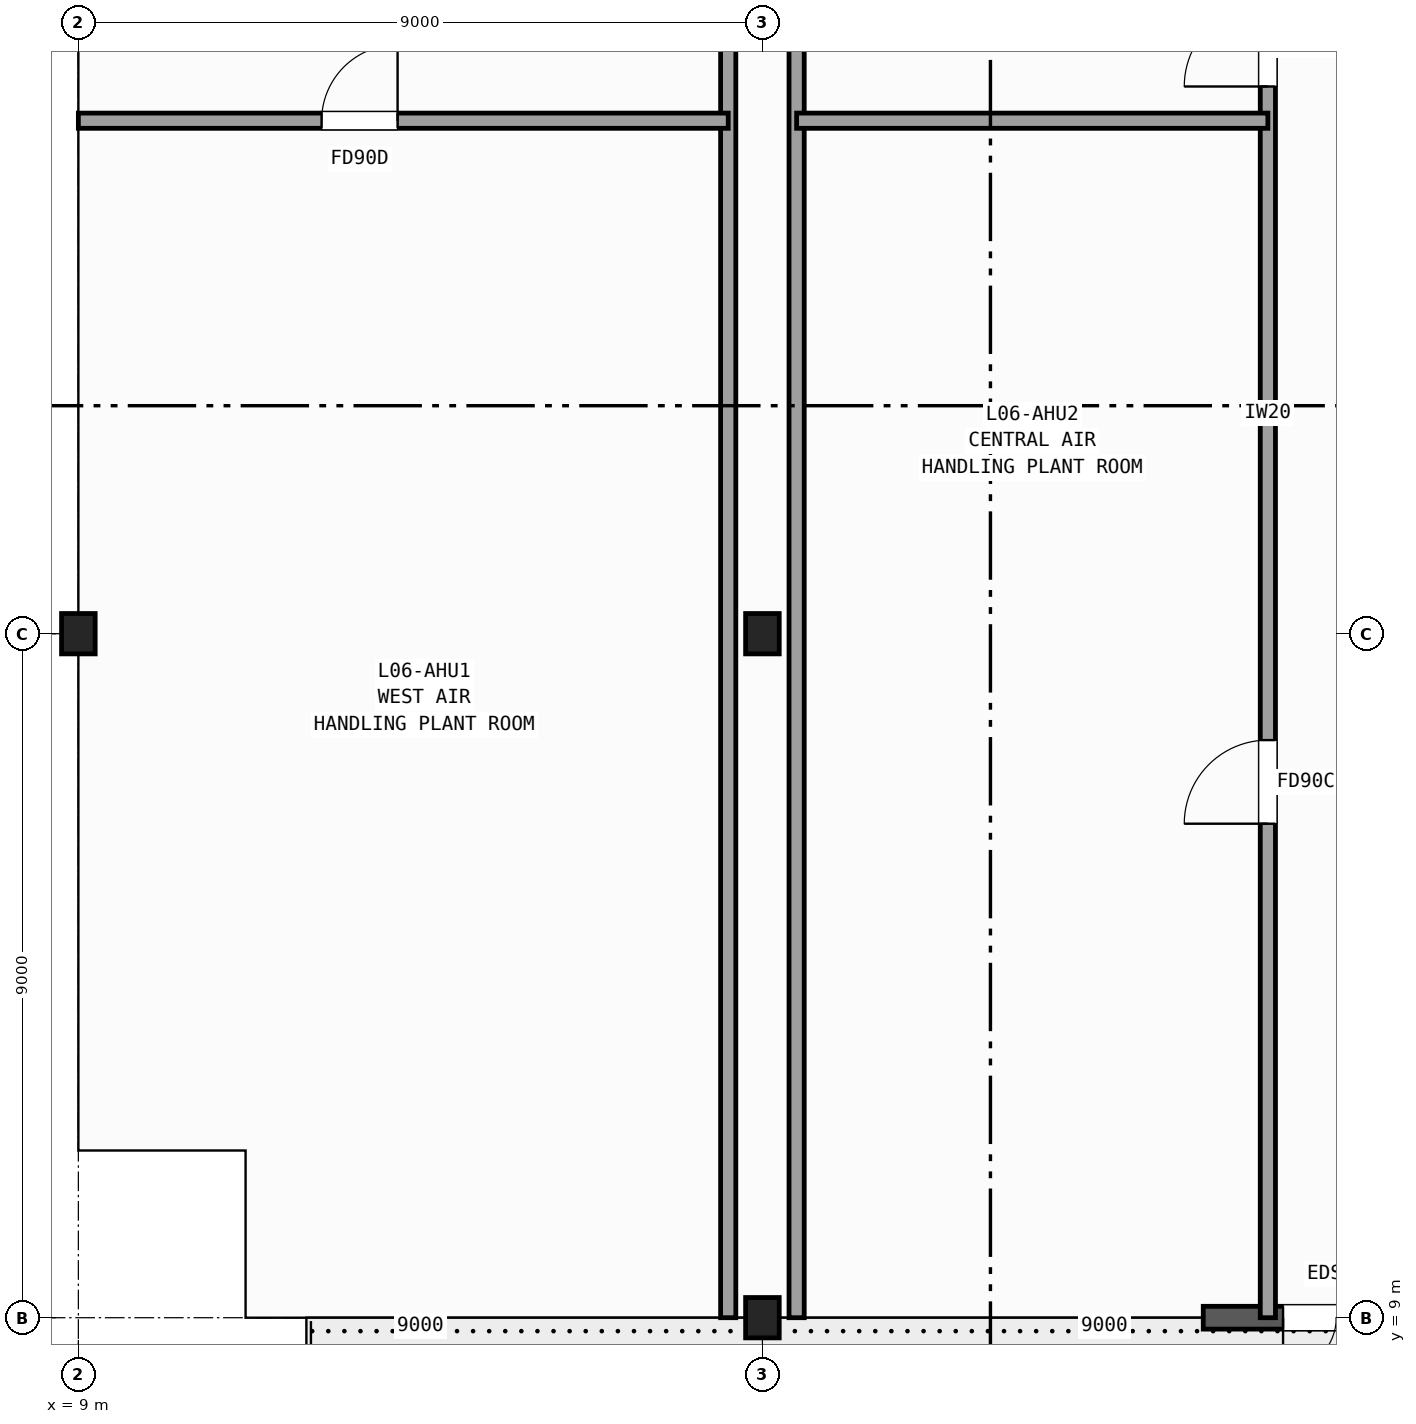
"""IFC4 building model, lengths in metres.
Left out: names, types, materials, properties, quantities, classifications, styles, units other than length and angle.
Written with IfcOpenShell. Run it as: python <this file> out.ifc"""

import sys

from ifc_helpers import new_model, si_unit, direction, frame, frame_2d, origin, origin_2d, place, context, subcontext, project, spatial, rectangle, i_section, extrude, element, fill, save


model = new_model("IFC4")
c1 = context("Model", 3, precision=1e-05, world=origin(), true_north=direction((0.0, 1.0)))
c2 = subcontext(c1, "Body", "Model", "MODEL_VIEW")
j1 = project(units=[si_unit("LENGTHUNIT", "METRE"), si_unit("PLANEANGLEUNIT", "RADIAN")], contexts=[c1])
p1 = place(None, origin())
s1 = spatial("IfcSite", under=j1, at=p1, CompositionType="ELEMENT")
p2 = place(p1, origin())
s2 = spatial("IfcBuilding", under=s1, at=p2, CompositionType="ELEMENT")
p3 = place(p2, frame((0.0, 0.0, 30.8)))
s3 = spatial("IfcBuildingStorey", under=s2, at=p3, CompositionType="ELEMENT", Elevation=30.8)
for number, where, z_axis, x_axis in (
    (1, (9.0, 18.0, 0.0), (0.0, 0.0, 1.0), (1.0, 0.0, 0.0)),
    (2, (18.0, 9.0, 0.0), (0.0, 0.0, 1.0), (1.0, 0.0, 0.0)),
):
    element("IfcColumn", number, at=place(p3, frame(where, z_axis=z_axis, x_axis=x_axis)), inside=s3, PredefinedType="COLUMN", context=c2, shape_type="SweptSolid", body=[
        extrude(i_section(OverallWidth=0.442, OverallDepth=0.531, WebThickness=0.066, FlangeThickness=0.106, FilletRadius=0.015, at=origin_2d()), origin(), (0.0, 0.0, 1.0), 5.2),
    ])
p4 = place(p3, frame((18.0, 18.0, -0.36), z_axis=(0.0, 0.0, 1.0), x_axis=(1.0, 0.0, 0.0)))
e3 = element("IfcColumn", 3, at=p4, inside=s3, PredefinedType="COLUMN", context=c2, shape_type="SweptSolid", body=[
    extrude(i_section(OverallWidth=0.442, OverallDepth=0.531, WebThickness=0.066, FlangeThickness=0.106, FilletRadius=0.015, at=origin_2d()), origin(), (0.0, 0.0, 1.0), 5.56),
])
p5 = place(p3, frame((60.93, 9.0, 0.0), z_axis=(0.0, 0.0, 1.0), x_axis=(-1.0, 0.0, 0.0)))
e4 = element("IfcWall", 4, at=p5, inside=s3, PredefinedType="SOLIDWALL", context=c2, shape_type="SweptSolid", body=[
    extrude(rectangle(XDim=37.13, YDim=0.3, at=frame_2d((18.565, 0.0))), origin(), (0.0, 0.0, 1.0), 4.92),
])
p6 = place(p5, frame((34.68, 0.0, 0.0)))
e5 = element("IfcOpeningElement", 5, at=p6, cuts=e4, PredefinedType="OPENING", context=c2, shape_type="SweptSolid", body=[
    extrude(rectangle(XDim=1.4, YDim=2.25, at=frame_2d((0.7, 1.125))), frame((0.0, 0.16, 0.0), z_axis=(0.0, -1.0, 0.0), x_axis=(1.0, 0.0, 0.0)), (0.0, 0.0, 1.0), 0.32),
])
p7 = place(p3, frame((24.65, 9.0, 0.0), z_axis=(0.0, 0.0, 1.0), x_axis=(0.0, 1.0, 0.0)))
e6 = element("IfcWall", 6, at=p7, inside=s3, PredefinedType="PARTITIONING", context=c2, shape_type="SweptSolid", body=[
    extrude(rectangle(XDim=19.2, YDim=0.2, at=frame_2d((9.6, 0.0))), origin(), (0.0, 0.0, 1.0), 3.973),
])
p8 = place(p7, frame((6.5, 0.0, 0.0)))
e7 = element("IfcOpeningElement", 7, at=p8, cuts=e6, PredefinedType="OPENING", context=c2, shape_type="SweptSolid", body=[
    extrude(rectangle(XDim=1.1, YDim=2.15, at=frame_2d((0.55, 1.075))), frame((0.0, 0.11, 0.0), z_axis=(0.0, -1.0, 0.0), x_axis=(1.0, 0.0, 0.0)), (0.0, 0.0, 1.0), 0.22),
])
p9 = place(p7, frame((16.2, 0.0, 0.0)))
e8 = element("IfcOpeningElement", 8, at=p9, cuts=e6, PredefinedType="OPENING", context=c2, shape_type="SweptSolid", body=[
    extrude(rectangle(XDim=1.1, YDim=2.15, at=frame_2d((0.55, 1.075))), frame((0.0, 0.11, 0.0), z_axis=(0.0, -1.0, 0.0), x_axis=(1.0, 0.0, 0.0)), (0.0, 0.0, 1.0), 0.22),
])
for number, where, z_axis, x_axis in (
    (9, (17.55, 9.0, 0.0), (0.0, 0.0, 1.0), (0.0, 1.0, 0.0)),
    (10, (18.45, 9.0, 0.0), (0.0, 0.0, 1.0), (0.0, 1.0, 0.0)),
):
    element("IfcWall", number, at=place(p3, frame(where, z_axis=z_axis, x_axis=x_axis)), inside=s3, PredefinedType="PARTITIONING", context=c2, shape_type="SweptSolid", body=[
        extrude(rectangle(XDim=18.15, YDim=0.2, at=frame_2d((9.075, 0.0))), origin(), (0.0, 0.0, 1.0), 3.973),
    ])
p10 = place(p3, frame((9.0, 24.75, 0.0), z_axis=(0.0, 0.0, 1.0), x_axis=(1.0, 0.0, 0.0)))
e11 = element("IfcWall", 11, at=p10, inside=s3, PredefinedType="PARTITIONING", context=c2, shape_type="SweptSolid", body=[
    extrude(rectangle(XDim=8.55, YDim=0.2, at=frame_2d((4.275, 0.0))), origin(), (0.0, 0.0, 1.0), 4.127),
])
p11 = place(p10, frame((3.2, 0.0, 0.0)))
e12 = element("IfcOpeningElement", 12, at=p11, cuts=e11, PredefinedType="OPENING", context=c2, shape_type="SweptSolid", body=[
    extrude(rectangle(XDim=1.0, YDim=2.15, at=frame_2d((0.5, 1.075))), frame((0.0, 0.11, 0.0), z_axis=(0.0, -1.0, 0.0), x_axis=(1.0, 0.0, 0.0)), (0.0, 0.0, 1.0), 0.22),
])
p12 = place(p3, frame((18.45, 24.75, 0.0), z_axis=(0.0, 0.0, 1.0), x_axis=(1.0, 0.0, 0.0)))
e13 = element("IfcWall", 13, at=p12, inside=s3, PredefinedType="PARTITIONING", context=c2, shape_type="SweptSolid", body=[
    extrude(rectangle(XDim=6.2, YDim=0.2, at=frame_2d((3.1, 0.0))), origin(), (0.0, 0.0, 1.0), 4.92),
])
p13 = place(p6, origin())
e14 = element("IfcDoor", 14, at=p13, inside=s3, OperationType="DOUBLE_DOOR_SINGLE_SWING", PredefinedType="DOOR", context=c2, shape_type="SweptSolid", body=[
    extrude(rectangle(XDim=1.4, YDim=2.25, at=frame_2d((0.7, 1.125))), frame((0.0, 0.025, 0.0), z_axis=(0.0, -1.0, 0.0), x_axis=(1.0, 0.0, 0.0)), (0.0, 0.0, 1.0), 0.05),
])
fill(e5, e14)
p14 = place(p8, origin())
e15 = element("IfcDoor", 15, at=p14, inside=s3, OperationType="SINGLE_SWING_LEFT", PredefinedType="DOOR", context=c2, shape_type="SweptSolid", body=[
    extrude(rectangle(XDim=1.1, YDim=2.15, at=frame_2d((0.55, 1.075))), frame((0.0, 0.025, 0.0), z_axis=(0.0, -1.0, 0.0), x_axis=(1.0, 0.0, 0.0)), (0.0, 0.0, 1.0), 0.05),
])
fill(e7, e15)
p15 = place(p11, origin())
e16 = element("IfcDoor", 16, at=p15, inside=s3, OperationType="SINGLE_SWING_RIGHT", PredefinedType="DOOR", context=c2, shape_type="SweptSolid", body=[
    extrude(rectangle(XDim=1.0, YDim=2.15, at=frame_2d((0.5, 1.075))), frame((0.0, 0.025, 0.0), z_axis=(0.0, -1.0, 0.0), x_axis=(1.0, 0.0, 0.0)), (0.0, 0.0, 1.0), 0.05),
])
fill(e12, e16)
p16 = place(p9, origin())
e17 = element("IfcDoor", 17, at=p16, inside=s3, OperationType="SINGLE_SWING_LEFT", PredefinedType="DOOR", context=c2, shape_type="SweptSolid", body=[
    extrude(rectangle(XDim=1.1, YDim=2.15, at=frame_2d((0.55, 1.075))), frame((0.0, 0.025, 0.0), z_axis=(0.0, -1.0, 0.0), x_axis=(1.0, 0.0, 0.0)), (0.0, 0.0, 1.0), 0.05),
])
fill(e8, e17)
save(model, sys.argv[1])
